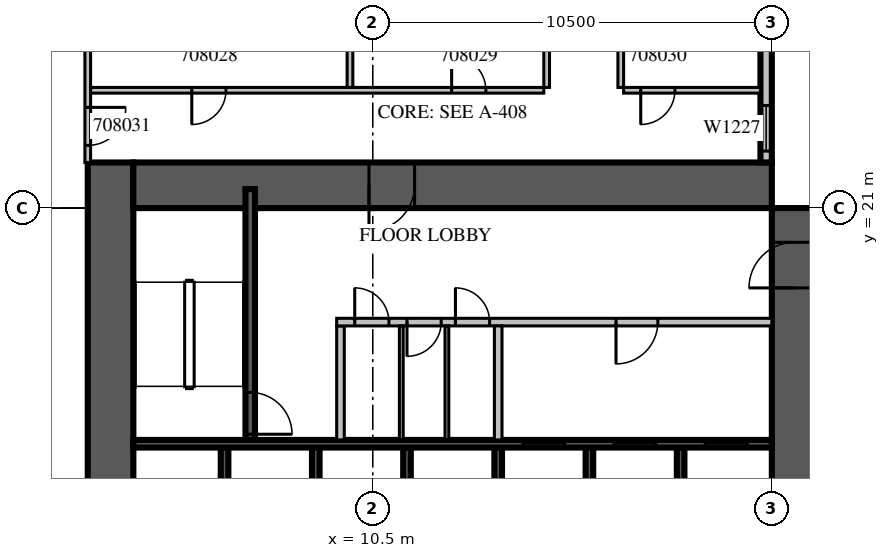
"""IFC4 building model, lengths in metres.
Left out: names, types, materials, properties, quantities, classifications, styles, units other than length and angle.
Written with IfcOpenShell. Run it as: python <this file> out.ifc"""

import sys

from ifc_helpers import new_model, si_unit, direction, frame, frame_2d, origin, place, context, subcontext, project, spatial, rectangle, extrude, source, transform, mapped, element, fill, save


model = new_model("IFC4")
c1 = context("Model", 3, precision=1e-05, world=origin(), true_north=direction((0.0, 1.0)))
c2 = subcontext(c1, "Body", "Model", "MODEL_VIEW")
j1 = project(units=[si_unit("LENGTHUNIT", "METRE"), si_unit("PLANEANGLEUNIT", "RADIAN")], contexts=[c1])
p1 = place(None, origin())
s1 = spatial("IfcSite", under=j1, at=p1, CompositionType="ELEMENT")
p2 = place(p1, origin())
s2 = spatial("IfcBuilding", under=s1, at=p2, CompositionType="ELEMENT")
p3 = place(p2, frame((0.0, 0.0, 44.7)))
s3 = spatial("IfcBuildingStorey", under=s2, at=p3, CompositionType="ELEMENT", Elevation=44.7)
m1 = source(origin(), c2, "Body", "SweptSolid", [
    extrude(rectangle(XDim=18.0, YDim=1.2, at=frame_2d((9.0, 0.0))), origin(), (0.0, 0.0, 1.0), 4.2),
])
p4 = place(p3, frame((3.6, 4.2, 0.0), z_axis=(0.0, 0.0, 1.0), x_axis=(0.0, 1.0, 0.0)))
e1 = element("IfcWall", 1, at=p4, inside=s3, PredefinedType="SHEAR", context=c2, shape_type="MappedRepresentation", body=[
    mapped(m1, transform((0.0, 0.0, 0.0), scale=1.0)),
])
m2 = source(origin(), c2, "Body", "SweptSolid", [
    extrude(rectangle(XDim=2.2, YDim=2.1, at=frame_2d((1.1, 1.05))), frame((0.0, 0.61, 0.0), z_axis=(0.0, -1.0, 0.0), x_axis=(1.0, 0.0, 0.0)), (0.0, 0.0, 1.0), 1.22),
])
p5 = place(p4, frame((4.2, 0.0, 0.0)))
e2 = element("IfcOpeningElement", 2, at=p5, cuts=e1, PredefinedType="OPENING", context=c2, shape_type="MappedRepresentation", body=[
    mapped(m2, transform((0.0, 0.0, 0.0), scale=1.0)),
])
m3 = source(origin(), c2, "Body", "SweptSolid", [
    extrude(rectangle(XDim=16.8, YDim=1.2, at=frame_2d((8.4, 0.0))), origin(), (0.0, 0.0, 1.0), 4.2),
])
p6 = place(p3, frame((21.6, 4.2, 0.0), z_axis=(0.0, 0.0, 1.0), x_axis=(0.0, 1.0, 0.0)))
e3 = element("IfcWall", 3, at=p6, inside=s3, PredefinedType="SHEAR", context=c2, shape_type="MappedRepresentation", body=[
    mapped(m3, transform((0.0, 0.0, 0.0), scale=1.0)),
])
p7 = place(p6, frame((4.2, 0.0, 0.0)))
e4 = element("IfcOpeningElement", 4, at=p7, cuts=e3, PredefinedType="OPENING", context=c2, shape_type="MappedRepresentation", body=[
    mapped(m2, transform((0.0, 0.0, 0.0), scale=1.0)),
])
m4 = source(origin(), c2, "Body", "SweptSolid", [
    extrude(rectangle(XDim=1.2, YDim=2.1, at=frame_2d((0.6, 1.05))), frame((0.0, 0.61, 0.0), z_axis=(0.0, -1.0, 0.0), x_axis=(1.0, 0.0, 0.0)), (0.0, 0.0, 1.0), 1.22),
])
p8 = place(p6, frame((14.7, 0.0, 0.0)))
e5 = element("IfcOpeningElement", 5, at=p8, cuts=e3, PredefinedType="OPENING", context=c2, shape_type="MappedRepresentation", body=[
    mapped(m4, transform((0.0, 0.0, 0.0), scale=1.0)),
])
p9 = place(p3, frame((4.2, 21.6, 0.0), z_axis=(0.0, 0.0, 1.0), x_axis=(1.0, 0.0, 0.0)))
e6 = element("IfcWall", 6, at=p9, inside=s3, PredefinedType="SHEAR", context=c2, shape_type="MappedRepresentation", body=[
    mapped(m3, transform((0.0, 0.0, 0.0), scale=1.0)),
])
p10 = place(p9, frame((6.2, 0.0, 0.0)))
e7 = element("IfcOpeningElement", 7, at=p10, cuts=e6, PredefinedType="OPENING", context=c2, shape_type="MappedRepresentation", body=[
    mapped(m4, transform((0.0, 0.0, 0.0), scale=1.0)),
])
p11 = place(p3, frame((20.85, 22.2, 0.0), z_axis=(0.0, 0.0, 1.0), x_axis=(0.0, 1.0, 0.0)))
e8 = element("IfcWall", 8, at=p11, inside=s3, PredefinedType="STANDARD", context=c2, shape_type="SweptSolid", body=[
    extrude(rectangle(XDim=6.6, YDim=0.3, at=frame_2d((3.3, 0.0))), origin(), (0.0, 0.0, 1.0), 3.8),
])
m5 = source(origin(), c2, "Body", "SweptSolid", [
    extrude(rectangle(XDim=1.2, YDim=2.7, at=frame_2d((0.6, 1.35))), frame((0.0, 0.16, 0.0), z_axis=(0.0, -1.0, 0.0), x_axis=(1.0, 0.0, 0.0)), (0.0, 0.0, 1.0), 0.32),
])
p12 = place(p11, frame((0.3, 0.0, 0.6)))
e9 = element("IfcOpeningElement", 9, at=p12, cuts=e8, PredefinedType="OPENING", context=c2, shape_type="MappedRepresentation", body=[
    mapped(m5, transform((0.0, 0.0, 0.0), scale=1.0)),
])
m6 = source(origin(), c2, "Body", "SweptSolid", [
    extrude(rectangle(XDim=2.4, YDim=2.7, at=frame_2d((1.2, 1.35))), frame((0.0, 0.16, 0.0), z_axis=(0.0, -1.0, 0.0), x_axis=(1.0, 0.0, 0.0)), (0.0, 0.0, 1.0), 0.32),
])
p13 = place(p11, frame((3.9, 0.0, 0.6)))
e10 = element("IfcOpeningElement", 10, at=p13, cuts=e8, PredefinedType="OPENING", context=c2, shape_type="MappedRepresentation", body=[
    mapped(m6, transform((0.0, 0.0, 0.0), scale=1.0)),
])
m7 = source(origin(), c2, "Body", "SweptSolid", [
    extrude(rectangle(XDim=3.0, YDim=0.2, at=frame_2d((1.5, 0.0))), origin(), (0.0, 0.0, 1.0), 4.2),
])
for number, where, z_axis, x_axis in (
    (11, (6.6, 11.7, 0.0), (0.0, 0.0, 1.0), (0.0, 1.0, 0.0)),
    (12, (9.0, 11.7, 0.0), (0.0, 0.0, 1.0), (0.0, 1.0, 0.0)),
    (13, (11.4, 11.7, 0.0), (0.0, 0.0, 1.0), (0.0, 1.0, 0.0)),
    (14, (13.8, 11.7, 0.0), (0.0, 0.0, 1.0), (0.0, 1.0, 0.0)),
    (15, (16.2, 11.7, 0.0), (0.0, 0.0, 1.0), (0.0, 1.0, 0.0)),
    (16, (18.6, 11.7, 0.0), (0.0, 0.0, 1.0), (0.0, 1.0, 0.0)),
):
    element("IfcWall", number, at=place(p3, frame(where, z_axis=z_axis, x_axis=x_axis)), inside=s3, PredefinedType="SOLIDWALL", context=c2, shape_type="MappedRepresentation", body=[
        mapped(m7, transform((0.0, 0.0, 0.0), scale=1.0)),
    ])
m8 = source(origin(), c2, "Body", "SweptSolid", [
    extrude(rectangle(XDim=16.8, YDim=0.2, at=frame_2d((8.4, 0.0))), origin(), (0.0, 0.0, 1.0), 4.2),
])
p14 = place(p3, frame((4.2, 14.8, 0.0), z_axis=(0.0, 0.0, 1.0), x_axis=(1.0, 0.0, 0.0)))
e17 = element("IfcWall", 17, at=p14, inside=s3, PredefinedType="SOLIDWALL", context=c2, shape_type="MappedRepresentation", body=[
    mapped(m8, transform((0.0, 0.0, 0.0), scale=1.0)),
])
m9 = source(origin(), c2, "Body", "SweptSolid", [
    extrude(rectangle(XDim=1.1, YDim=2.1, at=frame_2d((0.55, 1.05))), frame((0.0, 0.11, 0.0), z_axis=(0.0, -1.0, 0.0), x_axis=(1.0, 0.0, 0.0)), (0.0, 0.0, 1.0), 0.22),
])
p15 = place(p14, frame((10.25, 0.0, 0.0)))
e18 = element("IfcOpeningElement", 18, at=p15, cuts=e17, PredefinedType="OPENING", context=c2, shape_type="MappedRepresentation", body=[
    mapped(m9, transform((0.0, 0.0, 0.0), scale=1.0)),
])
p16 = place(p14, frame((12.65, 0.0, 0.0)))
e19 = element("IfcOpeningElement", 19, at=p16, cuts=e17, PredefinedType="OPENING", context=c2, shape_type="MappedRepresentation", body=[
    mapped(m9, transform((0.0, 0.0, 0.0), scale=1.0)),
])
p17 = place(p14, frame((15.05, 0.0, 0.0)))
e20 = element("IfcOpeningElement", 20, at=p17, cuts=e17, PredefinedType="OPENING", context=c2, shape_type="MappedRepresentation", body=[
    mapped(m9, transform((0.0, 0.0, 0.0), scale=1.0)),
])
m10 = source(origin(), c2, "Body", "SweptSolid", [
    extrude(rectangle(XDim=6.6, YDim=0.25, at=frame_2d((3.3, 0.0))), origin(), (0.0, 0.0, 1.0), 3.8),
])
p18 = place(p3, frame((7.275, 14.9, 0.0), z_axis=(0.0, 0.0, 1.0), x_axis=(0.0, 1.0, 0.0)))
e21 = element("IfcWall", 21, at=p18, inside=s3, PredefinedType="SOLIDWALL", context=c2, shape_type="MappedRepresentation", body=[
    mapped(m10, transform((0.0, 0.0, 0.0), scale=1.0)),
])
m11 = source(origin(), c2, "Body", "SweptSolid", [
    extrude(rectangle(XDim=1.1, YDim=2.1, at=frame_2d((0.55, 1.05))), frame((0.0, 0.135, 0.0), z_axis=(0.0, -1.0, 0.0), x_axis=(1.0, 0.0, 0.0)), (0.0, 0.0, 1.0), 0.27),
])
p19 = place(p18, frame((0.15, 0.0, 0.0)))
e22 = element("IfcOpeningElement", 22, at=p19, cuts=e21, PredefinedType="OPENING", context=c2, shape_type="MappedRepresentation", body=[
    mapped(m11, transform((0.0, 0.0, 0.0), scale=1.0)),
])
m12 = source(origin(), c2, "Body", "SweptSolid", [
    extrude(rectangle(XDim=3.0, YDim=0.2, at=frame_2d((1.5, 0.0))), origin(), (0.0, 0.0, 1.0), 3.8),
])
p20 = place(p3, frame((9.65, 14.9, 0.0), z_axis=(0.0, 0.0, 1.0), x_axis=(0.0, 1.0, 0.0)))
e23 = element("IfcWall", 23, at=p20, inside=s3, PredefinedType="PARTITIONING", context=c2, shape_type="MappedRepresentation", body=[
    mapped(m12, transform((0.0, 0.0, 0.0), scale=1.0)),
])
m13 = source(origin(), c2, "Body", "SweptSolid", [
    extrude(rectangle(XDim=11.45, YDim=0.2, at=frame_2d((5.725, 0.0))), origin(), (0.0, 0.0, 1.0), 3.8),
])
p21 = place(p3, frame((9.55, 18.0, 0.0), z_axis=(0.0, 0.0, 1.0), x_axis=(1.0, 0.0, 0.0)))
e24 = element("IfcWall", 24, at=p21, inside=s3, PredefinedType="PARTITIONING", context=c2, shape_type="MappedRepresentation", body=[
    mapped(m13, transform((0.0, 0.0, 0.0), scale=1.0)),
])
m14 = source(origin(), c2, "Body", "SweptSolid", [
    extrude(rectangle(XDim=0.9, YDim=2.1, at=frame_2d((0.45, 1.05))), frame((0.0, 0.11, 0.0), z_axis=(0.0, -1.0, 0.0), x_axis=(1.0, 0.0, 0.0)), (0.0, 0.0, 1.0), 0.22),
])
p22 = place(p21, frame((0.475, 0.0, 0.0)))
e25 = element("IfcOpeningElement", 25, at=p22, cuts=e24, PredefinedType="OPENING", context=c2, shape_type="MappedRepresentation", body=[
    mapped(m14, transform((0.0, 0.0, 0.0), scale=1.0)),
])
p23 = place(p21, frame((1.85, 0.0, 0.0)))
e26 = element("IfcOpeningElement", 26, at=p23, cuts=e24, PredefinedType="OPENING", context=c2, shape_type="MappedRepresentation", body=[
    mapped(m14, transform((0.0, 0.0, 0.0), scale=1.0)),
])
p24 = place(p21, frame((3.125, 0.0, 0.0)))
e27 = element("IfcOpeningElement", 27, at=p24, cuts=e24, PredefinedType="OPENING", context=c2, shape_type="MappedRepresentation", body=[
    mapped(m14, transform((0.0, 0.0, 0.0), scale=1.0)),
])
p25 = place(p21, frame((7.35, 0.0, 0.0)))
e28 = element("IfcOpeningElement", 28, at=p25, cuts=e24, PredefinedType="OPENING", context=c2, shape_type="MappedRepresentation", body=[
    mapped(m9, transform((0.0, 0.0, 0.0), scale=1.0)),
])
p26 = place(p3, frame((13.8, 14.9, 0.0), z_axis=(0.0, 0.0, 1.0), x_axis=(0.0, 1.0, 0.0)))
e29 = element("IfcWall", 29, at=p26, inside=s3, PredefinedType="PARTITIONING", context=c2, shape_type="MappedRepresentation", body=[
    mapped(m12, transform((0.0, 0.0, 0.0), scale=1.0)),
])
m15 = source(origin(), c2, "Body", "SweptSolid", [
    extrude(rectangle(XDim=3.0, YDim=0.1, at=frame_2d((1.5, 0.0))), origin(), (0.0, 0.0, 1.0), 3.8),
])
for number, where, z_axis, x_axis in (
    (30, (11.25, 14.9, 0.0), (0.0, 0.0, 1.0), (0.0, 1.0, 0.0)),
    (31, (12.45, 14.9, 0.0), (0.0, 0.0, 1.0), (0.0, 1.0, 0.0)),
):
    element("IfcWall", number, at=place(p3, frame(where, z_axis=z_axis, x_axis=x_axis)), inside=s3, PredefinedType="PARTITIONING", context=c2, shape_type="MappedRepresentation", body=[
        mapped(m15, transform((0.0, 0.0, 0.0), scale=1.0)),
    ])
m16 = source(origin(), c2, "Body", "SweptSolid", [
    extrude(rectangle(XDim=11.925, YDim=0.15, at=frame_2d((5.963, 0.0))), origin(), (0.0, 0.0, 1.0), 3.8),
])
p27 = place(p3, frame((3.075, 24.1, 0.0), z_axis=(0.0, 0.0, 1.0), x_axis=(1.0, 0.0, 0.0)))
e32 = element("IfcWall", 32, at=p27, inside=s3, PredefinedType="PARTITIONING", context=c2, shape_type="MappedRepresentation", body=[
    mapped(m16, transform((0.0, 0.0, 0.0), scale=1.0)),
])
m17 = source(origin(), c2, "Body", "SweptSolid", [
    extrude(rectangle(XDim=0.9, YDim=2.1, at=frame_2d((0.45, 1.05))), frame((0.0, 0.085, 0.0), z_axis=(0.0, -1.0, 0.0), x_axis=(1.0, 0.0, 0.0)), (0.0, 0.0, 1.0), 0.17),
])
p28 = place(p27, frame((2.663, 0.0, 0.0)))
e33 = element("IfcOpeningElement", 33, at=p28, cuts=e32, PredefinedType="OPENING", context=c2, shape_type="MappedRepresentation", body=[
    mapped(m17, transform((0.0, 0.0, 0.0), scale=1.0)),
])
p29 = place(p27, frame((9.5, 0.0, 0.0)))
e34 = element("IfcOpeningElement", 34, at=p29, cuts=e32, PredefinedType="OPENING", context=c2, shape_type="MappedRepresentation", body=[
    mapped(m17, transform((0.0, 0.0, 0.0), scale=1.0)),
])
m18 = source(origin(), c2, "Body", "SweptSolid", [
    extrude(rectangle(XDim=3.6, YDim=0.15, at=frame_2d((1.8, 0.0))), origin(), (0.0, 0.0, 1.0), 3.8),
])
p30 = place(p3, frame((17.1, 24.1, 0.0), z_axis=(0.0, 0.0, 1.0), x_axis=(1.0, 0.0, 0.0)))
e35 = element("IfcWall", 35, at=p30, inside=s3, PredefinedType="PARTITIONING", context=c2, shape_type="MappedRepresentation", body=[
    mapped(m18, transform((0.0, 0.0, 0.0), scale=1.0)),
])
p31 = place(p30, frame((0.45, 0.0, 0.0)))
e36 = element("IfcOpeningElement", 36, at=p31, cuts=e35, PredefinedType="OPENING", context=c2, shape_type="MappedRepresentation", body=[
    mapped(m17, transform((0.0, 0.0, 0.0), scale=1.0)),
])
m19 = source(origin(), c2, "Body", "SweptSolid", [
    extrude(rectangle(XDim=5.15, YDim=0.15, at=frame_2d((2.575, 0.0))), origin(), (0.0, 0.0, 1.0), 3.8),
])
for number, where, z_axis, x_axis in (
    (37, (9.9, 24.175, 0.0), (0.0, 0.0, 1.0), (0.0, 1.0, 0.0)),
    (38, (15.075, 24.175, 0.0), (0.0, 0.0, 1.0), (0.0, 1.0, 0.0)),
    (39, (17.025, 29.325, 0.0), (0.0, 0.0, 1.0), (0.0, -1.0, 0.0)),
):
    element("IfcWall", number, at=place(p3, frame(where, z_axis=z_axis, x_axis=x_axis)), inside=s3, PredefinedType="PARTITIONING", context=c2, shape_type="MappedRepresentation", body=[
        mapped(m19, transform((0.0, 0.0, 0.0), scale=1.0)),
    ])
m20 = source(origin(), c2, "Body", "SweptSolid", [
    extrude(rectangle(XDim=7.125, YDim=0.15, at=frame_2d((3.562, 0.0))), origin(), (0.0, 0.0, 1.0), 3.8),
])
p32 = place(p3, frame((3.0, 29.325, 0.0), z_axis=(0.0, 0.0, 1.0), x_axis=(0.0, -1.0, 0.0)))
e40 = element("IfcWall", 40, at=p32, inside=s3, PredefinedType="PARTITIONING", context=c2, shape_type="MappedRepresentation", body=[
    mapped(m20, transform((0.0, 0.0, 0.0), scale=1.0)),
])
m21 = source(origin(), c2, "Body", "SweptSolid", [
    extrude(rectangle(XDim=1.0, YDim=2.1, at=frame_2d((0.5, 1.05))), frame((0.0, 0.085, 0.0), z_axis=(0.0, -1.0, 0.0), x_axis=(1.0, 0.0, 0.0)), (0.0, 0.0, 1.0), 0.17),
])
p33 = place(p32, frame((5.675, 0.0, 0.0)))
e41 = element("IfcOpeningElement", 41, at=p33, cuts=e40, PredefinedType="OPENING", context=c2, shape_type="MappedRepresentation", body=[
    mapped(m21, transform((0.0, 0.0, 0.0), scale=1.0)),
])
m22 = source(origin(), c2, "Body", "SweptSolid", [
    extrude(rectangle(XDim=1.2, YDim=2.7, at=frame_2d((0.6, 1.35))), frame((0.0, 0.03, 0.0), z_axis=(0.0, -1.0, 0.0), x_axis=(1.0, 0.0, 0.0)), (0.0, 0.0, 1.0), 0.06),
])
p34 = place(p12, origin())
e42 = element("IfcWindow", 42, at=p34, inside=s3, PartitioningType="SINGLE_PANEL", PredefinedType="WINDOW", context=c2, shape_type="MappedRepresentation", body=[
    mapped(m22, transform((0.0, 0.0, 0.0), scale=1.0)),
])
fill(e9, e42)
m23 = source(origin(), c2, "Body", "SweptSolid", [
    extrude(rectangle(XDim=1.1, YDim=2.1, at=frame_2d((0.55, 1.05))), frame((0.0, 0.025, 0.0), z_axis=(0.0, -1.0, 0.0), x_axis=(1.0, 0.0, 0.0)), (0.0, 0.0, 1.0), 0.05),
])
p35 = place(p15, origin())
e43 = element("IfcDoor", 43, at=p35, inside=s3, OperationType="SLIDING_TO_LEFT", PredefinedType="DOOR", context=c2, shape_type="MappedRepresentation", body=[
    mapped(m23, transform((0.0, 0.0, 0.0), scale=1.0)),
])
fill(e18, e43)
p36 = place(p16, origin())
e44 = element("IfcDoor", 44, at=p36, inside=s3, OperationType="SLIDING_TO_LEFT", PredefinedType="DOOR", context=c2, shape_type="MappedRepresentation", body=[
    mapped(m23, transform((0.0, 0.0, 0.0), scale=1.0)),
])
fill(e19, e44)
p37 = place(p17, origin())
e45 = element("IfcDoor", 45, at=p37, inside=s3, OperationType="SLIDING_TO_LEFT", PredefinedType="DOOR", context=c2, shape_type="MappedRepresentation", body=[
    mapped(m23, transform((0.0, 0.0, 0.0), scale=1.0)),
])
fill(e20, e45)
p38 = place(p19, origin())
e46 = element("IfcDoor", 46, at=p38, inside=s3, OperationType="SINGLE_SWING_RIGHT", PredefinedType="DOOR", context=c2, shape_type="MappedRepresentation", body=[
    mapped(m23, transform((0.0, 0.0, 0.0), scale=1.0)),
])
fill(e22, e46)
m24 = source(origin(), c2, "Body", "SweptSolid", [
    extrude(rectangle(XDim=0.9, YDim=2.1, at=frame_2d((0.45, 1.05))), frame((0.0, 0.025, 0.0), z_axis=(0.0, -1.0, 0.0), x_axis=(1.0, 0.0, 0.0)), (0.0, 0.0, 1.0), 0.05),
])
p39 = place(p22, origin())
e47 = element("IfcDoor", 47, at=p39, inside=s3, OperationType="SINGLE_SWING_LEFT", PredefinedType="DOOR", context=c2, shape_type="MappedRepresentation", body=[
    mapped(m24, transform((0.0, 0.0, 0.0), scale=1.0)),
])
fill(e25, e47)
p40 = place(p23, origin())
e48 = element("IfcDoor", 48, at=p40, inside=s3, OperationType="SINGLE_SWING_RIGHT", PredefinedType="DOOR", context=c2, shape_type="MappedRepresentation", body=[
    mapped(m24, transform((0.0, 0.0, 0.0), scale=1.0)),
])
fill(e26, e48)
p41 = place(p24, origin())
e49 = element("IfcDoor", 49, at=p41, inside=s3, OperationType="SINGLE_SWING_LEFT", PredefinedType="DOOR", context=c2, shape_type="MappedRepresentation", body=[
    mapped(m24, transform((0.0, 0.0, 0.0), scale=1.0)),
])
fill(e27, e49)
p42 = place(p25, origin())
e50 = element("IfcDoor", 50, at=p42, inside=s3, OperationType="SINGLE_SWING_RIGHT", PredefinedType="DOOR", context=c2, shape_type="MappedRepresentation", body=[
    mapped(m23, transform((0.0, 0.0, 0.0), scale=1.0)),
])
fill(e28, e50)
m25 = source(origin(), c2, "Body", "SweptSolid", [
    extrude(rectangle(XDim=1.2, YDim=2.1, at=frame_2d((0.6, 1.05))), frame((0.0, 0.025, 0.0), z_axis=(0.0, -1.0, 0.0), x_axis=(1.0, 0.0, 0.0)), (0.0, 0.0, 1.0), 0.05),
])
p43 = place(p10, origin())
e51 = element("IfcDoor", 51, at=p43, inside=s3, OperationType="SINGLE_SWING_RIGHT", PredefinedType="DOOR", context=c2, shape_type="MappedRepresentation", body=[
    mapped(m25, transform((0.0, 0.0, 0.0), scale=1.0)),
])
fill(e7, e51)
p44 = place(p8, origin())
e52 = element("IfcDoor", 52, at=p44, inside=s3, OperationType="SINGLE_SWING_LEFT", PredefinedType="DOOR", context=c2, shape_type="MappedRepresentation", body=[
    mapped(m25, transform((0.0, 0.0, 0.0), scale=1.0)),
])
fill(e5, e52)
p45 = place(p28, origin())
e53 = element("IfcDoor", 53, at=p45, inside=s3, OperationType="SINGLE_SWING_RIGHT", PredefinedType="DOOR", context=c2, shape_type="MappedRepresentation", body=[
    mapped(m24, transform((0.0, 0.0, 0.0), scale=1.0)),
])
fill(e33, e53)
p46 = place(p29, origin())
e54 = element("IfcDoor", 54, at=p46, inside=s3, OperationType="SINGLE_SWING_LEFT", PredefinedType="DOOR", context=c2, shape_type="MappedRepresentation", body=[
    mapped(m24, transform((0.0, 0.0, 0.0), scale=1.0)),
])
fill(e34, e54)
p47 = place(p31, origin())
e55 = element("IfcDoor", 55, at=p47, inside=s3, OperationType="SINGLE_SWING_RIGHT", PredefinedType="DOOR", context=c2, shape_type="MappedRepresentation", body=[
    mapped(m24, transform((0.0, 0.0, 0.0), scale=1.0)),
])
fill(e36, e55)
m26 = source(origin(), c2, "Body", "SweptSolid", [
    extrude(rectangle(XDim=1.0, YDim=2.1, at=frame_2d((0.5, 1.05))), frame((0.0, 0.025, 0.0), z_axis=(0.0, -1.0, 0.0), x_axis=(1.0, 0.0, 0.0)), (0.0, 0.0, 1.0), 0.05),
])
p48 = place(p33, origin())
e56 = element("IfcDoor", 56, at=p48, inside=s3, OperationType="SINGLE_SWING_LEFT", PredefinedType="DOOR", context=c2, shape_type="MappedRepresentation", body=[
    mapped(m26, transform((0.0, 0.0, 0.0), scale=1.0)),
])
fill(e41, e56)
save(model, sys.argv[1])
